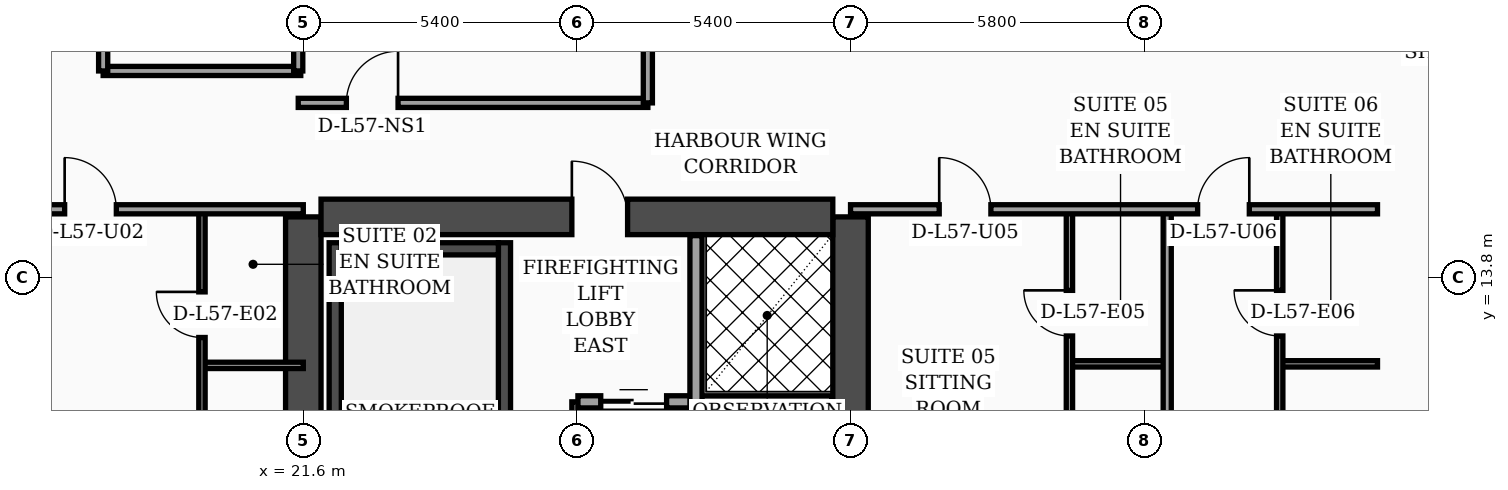
"""IFC4 building model, lengths in metres.
Left out: names, types, materials, properties, quantities, classifications, styles, units other than length and angle.
Written with IfcOpenShell. Run it as: python <this file> out.ifc"""

import sys

from ifc_helpers import new_model, si_unit, direction, frame, frame_2d, origin, place, context, subcontext, project, spatial, rectangle, extrude, element, fill, save


model = new_model("IFC4")
c1 = context("Model", 3, precision=1e-05, world=origin(), true_north=direction((0.0, 1.0)))
c2 = subcontext(c1, "Body", "Model", "MODEL_VIEW")
j1 = project(units=[si_unit("LENGTHUNIT", "METRE"), si_unit("PLANEANGLEUNIT", "RADIAN")], contexts=[c1])
p1 = place(None, origin())
s1 = spatial("IfcSite", under=j1, at=p1, CompositionType="ELEMENT")
p2 = place(p1, origin())
s2 = spatial("IfcBuilding", under=s1, at=p2, CompositionType="ELEMENT")
p3 = place(p2, frame((0.0, 0.0, 230.7)))
s3 = spatial("IfcBuildingStorey", under=s2, at=p3, CompositionType="ELEMENT", Elevation=230.7)
for number, where, z_axis, x_axis in (
    (1, (21.6, 4.6, 0.0), (0.0, 0.0, 1.0), (0.0, 1.0, 0.0)),
    (2, (32.4, 4.6, 0.0), (0.0, 0.0, 1.0), (0.0, 1.0, 0.0)),
):
    element("IfcWall", number, at=place(p3, frame(where, z_axis=z_axis, x_axis=x_axis)), inside=s3, PredefinedType="SHEAR", context=c2, shape_type="SweptSolid", body=[
        extrude(rectangle(XDim=10.4, YDim=0.7, at=frame_2d((5.2, 0.0))), origin(), (0.0, 0.0, 1.0), 3.52),
    ])
p4 = place(p3, frame((21.95, 15.0, 0.0), z_axis=(0.0, 0.0, 1.0), x_axis=(1.0, 0.0, 0.0)))
e3 = element("IfcWall", 3, at=p4, inside=s3, PredefinedType="SHEAR", context=c2, shape_type="SweptSolid", body=[
    extrude(rectangle(XDim=10.1, YDim=0.7, at=frame_2d((5.05, 0.0))), origin(), (0.0, 0.0, 1.0), 3.52),
])
p5 = place(p4, frame((4.95, 0.0, 0.0)))
e4 = element("IfcOpeningElement", 4, at=p5, cuts=e3, PredefinedType="OPENING", context=c2, shape_type="SweptSolid", body=[
    extrude(rectangle(XDim=1.1, YDim=2.2, at=frame_2d((0.55, 1.1))), frame((0.0, 0.36, 0.0), z_axis=(0.0, -1.0, 0.0), x_axis=(1.0, 0.0, 0.0)), (0.0, 0.0, 1.0), 0.72),
])
p6 = place(p3, frame((22.23, 4.95, 0.0), z_axis=(0.0, 0.0, 1.0), x_axis=(0.0, 1.0, 0.0)))
e5 = element("IfcWall", 5, at=p6, inside=s3, PredefinedType="SOLIDWALL", context=c2, shape_type="SweptSolid", body=[
    extrude(rectangle(XDim=9.54, YDim=0.24, at=frame_2d((4.77, 0.0))), origin(), (0.0, 0.0, 1.0), 3.52),
])
p7 = place(p3, frame((25.57, 4.95, 0.0), z_axis=(0.0, 0.0, 1.0), x_axis=(0.0, 1.0, 0.0)))
e6 = element("IfcWall", 6, at=p7, inside=s3, PredefinedType="SOLIDWALL", context=c2, shape_type="SweptSolid", body=[
    extrude(rectangle(XDim=9.54, YDim=0.24, at=frame_2d((4.77, 0.0))), origin(), (0.0, 0.0, 1.0), 3.52),
])
p8 = place(p7, frame((0.35, 0.0, 0.0)))
e7 = element("IfcOpeningElement", 7, at=p8, cuts=e6, PredefinedType="OPENING", context=c2, shape_type="SweptSolid", body=[
    extrude(rectangle(XDim=1.15, YDim=2.2, at=frame_2d((0.575, 1.1))), frame((0.0, 0.13, 0.0), z_axis=(0.0, -1.0, 0.0), x_axis=(1.0, 0.0, 0.0)), (0.0, 0.0, 1.0), 0.26),
])
p9 = place(p3, frame((22.35, 14.37, 0.0), z_axis=(0.0, 0.0, 1.0), x_axis=(1.0, 0.0, 0.0)))
e8 = element("IfcWall", 8, at=p9, inside=s3, PredefinedType="SOLIDWALL", context=c2, shape_type="SweptSolid", body=[
    extrude(rectangle(XDim=3.1, YDim=0.24, at=frame_2d((1.55, 0.0))), origin(), (0.0, 0.0, 1.0), 3.52),
])
p10 = place(p3, frame((49.43, 5.505, 0.0), z_axis=(0.0, 0.0, 1.0), x_axis=(-0.300509063924, 0.953778958931, 0.0)))
e9 = element("IfcWall", 9, at=p10, inside=s3, PredefinedType="SOLIDWALL", context=c2, shape_type="SweptSolid", body=[
    extrude(rectangle(XDim=30.814, YDim=0.32, at=frame_2d((15.407, 0.0))), origin(), (0.0, 0.0, 1.0), 3.52),
])
p11 = place(p10, frame((18.796, 0.0, 0.0)))
e10 = element("IfcOpeningElement", 10, at=p11, cuts=e9, PredefinedType="OPENING", context=c2, shape_type="SweptSolid", body=[
    extrude(rectangle(XDim=1.4, YDim=2.25, at=frame_2d((0.7, 1.125))), frame((0.0, 0.17, 0.0), z_axis=(0.0, -1.0, 0.0), x_axis=(1.0, 0.0, 0.0)), (0.0, 0.0, 1.0), 0.34),
])
p12 = place(p10, frame((4.437, 0.0, 0.7)))
e11 = element("IfcOpeningElement", 11, at=p12, cuts=e9, PredefinedType="OPENING", context=c2, shape_type="SweptSolid", body=[
    extrude(rectangle(XDim=1.6, YDim=1.65, at=frame_2d((0.8, 0.825))), frame((0.0, 0.17, 0.0), z_axis=(0.0, -1.0, 0.0), x_axis=(1.0, 0.0, 0.0)), (0.0, 0.0, 1.0), 0.34),
])
p13 = place(p10, frame((9.889, 0.0, 0.7)))
e12 = element("IfcOpeningElement", 12, at=p13, cuts=e9, PredefinedType="OPENING", context=c2, shape_type="SweptSolid", body=[
    extrude(rectangle(XDim=1.6, YDim=1.65, at=frame_2d((0.8, 0.825))), frame((0.0, 0.17, 0.0), z_axis=(0.0, -1.0, 0.0), x_axis=(1.0, 0.0, 0.0)), (0.0, 0.0, 1.0), 0.34),
])
p14 = place(p10, frame((1.6, 0.0, 0.75)))
e13 = element("IfcOpeningElement", 13, at=p14, cuts=e9, PredefinedType="OPENING", context=c2, shape_type="SweptSolid", body=[
    extrude(rectangle(XDim=1.5, YDim=1.6, at=frame_2d((0.75, 0.8))), frame((0.0, 0.17, 0.0), z_axis=(0.0, -1.0, 0.0), x_axis=(1.0, 0.0, 0.0)), (0.0, 0.0, 1.0), 0.34),
])
p15 = place(p10, frame((7.8, 0.0, 0.75)))
e14 = element("IfcOpeningElement", 14, at=p15, cuts=e9, PredefinedType="OPENING", context=c2, shape_type="SweptSolid", body=[
    extrude(rectangle(XDim=1.5, YDim=1.6, at=frame_2d((0.75, 0.8))), frame((0.0, 0.17, 0.0), z_axis=(0.0, -1.0, 0.0), x_axis=(1.0, 0.0, 0.0)), (0.0, 0.0, 1.0), 0.34),
])
p16 = place(p10, frame((11.95, 0.0, 0.75)))
e15 = element("IfcOpeningElement", 15, at=p16, cuts=e9, PredefinedType="OPENING", context=c2, shape_type="SweptSolid", body=[
    extrude(rectangle(XDim=1.5, YDim=1.6, at=frame_2d((0.75, 0.8))), frame((0.0, 0.17, 0.0), z_axis=(0.0, -1.0, 0.0), x_axis=(1.0, 0.0, 0.0)), (0.0, 0.0, 1.0), 0.34),
])
p17 = place(p10, frame((14.0, 0.0, 0.75)))
e16 = element("IfcOpeningElement", 16, at=p17, cuts=e9, PredefinedType="OPENING", context=c2, shape_type="SweptSolid", body=[
    extrude(rectangle(XDim=1.5, YDim=1.6, at=frame_2d((0.75, 0.8))), frame((0.0, 0.17, 0.0), z_axis=(0.0, -1.0, 0.0), x_axis=(1.0, 0.0, 0.0)), (0.0, 0.0, 1.0), 0.34),
])
p18 = place(p10, frame((16.55, 0.0, 0.75)))
e17 = element("IfcOpeningElement", 17, at=p18, cuts=e9, PredefinedType="OPENING", context=c2, shape_type="SweptSolid", body=[
    extrude(rectangle(XDim=1.5, YDim=1.6, at=frame_2d((0.75, 0.8))), frame((0.0, 0.17, 0.0), z_axis=(0.0, -1.0, 0.0), x_axis=(1.0, 0.0, 0.0)), (0.0, 0.0, 1.0), 0.34),
])
p19 = place(p10, frame((20.75, 0.0, 0.75)))
e18 = element("IfcOpeningElement", 18, at=p19, cuts=e9, PredefinedType="OPENING", context=c2, shape_type="SweptSolid", body=[
    extrude(rectangle(XDim=1.5, YDim=1.6, at=frame_2d((0.75, 0.8))), frame((0.0, 0.17, 0.0), z_axis=(0.0, -1.0, 0.0), x_axis=(1.0, 0.0, 0.0)), (0.0, 0.0, 1.0), 0.34),
])
p20 = place(p10, frame((23.3, 0.0, 0.75)))
e19 = element("IfcOpeningElement", 19, at=p20, cuts=e9, PredefinedType="OPENING", context=c2, shape_type="SweptSolid", body=[
    extrude(rectangle(XDim=1.5, YDim=1.6, at=frame_2d((0.75, 0.8))), frame((0.0, 0.17, 0.0), z_axis=(0.0, -1.0, 0.0), x_axis=(1.0, 0.0, 0.0)), (0.0, 0.0, 1.0), 0.34),
])
p21 = place(p10, frame((26.4, 0.0, 0.75)))
e20 = element("IfcOpeningElement", 20, at=p21, cuts=e9, PredefinedType="OPENING", context=c2, shape_type="SweptSolid", body=[
    extrude(rectangle(XDim=1.5, YDim=1.6, at=frame_2d((0.75, 0.8))), frame((0.0, 0.17, 0.0), z_axis=(0.0, -1.0, 0.0), x_axis=(1.0, 0.0, 0.0)), (0.0, 0.0, 1.0), 0.34),
])
p22 = place(p3, frame((27.02, 4.97, 0.0), z_axis=(0.0, 0.0, 1.0), x_axis=(0.0, 1.0, 0.0)))
e21 = element("IfcWall", 21, at=p22, inside=s3, PredefinedType="SOLIDWALL", context=c2, shape_type="SweptSolid", body=[
    extrude(rectangle(XDim=6.38, YDim=0.24, at=frame_2d((3.19, 0.0))), origin(), (0.0, 0.0, 1.0), 3.52),
])
p23 = place(p3, frame((27.02, 11.35, 0.0), z_axis=(0.0, 0.0, 1.0), x_axis=(1.0, 0.0, 0.0)))
e22 = element("IfcWall", 22, at=p23, inside=s3, PredefinedType="SOLIDWALL", context=c2, shape_type="SweptSolid", body=[
    extrude(rectangle(XDim=5.01, YDim=0.24, at=frame_2d((2.505, 0.0))), origin(), (0.0, 0.0, 1.0), 3.52),
])
p24 = place(p23, frame((0.45, 0.0, 0.0)))
e23 = element("IfcOpeningElement", 23, at=p24, cuts=e22, PredefinedType="OPENING", context=c2, shape_type="SweptSolid", body=[
    extrude(rectangle(XDim=1.3, YDim=2.35, at=frame_2d((0.65, 1.175))), frame((0.0, 0.13, 0.0), z_axis=(0.0, -1.0, 0.0), x_axis=(1.0, 0.0, 0.0)), (0.0, 0.0, 1.0), 0.26),
])
p25 = place(p3, frame((29.35, 4.97, 0.0), z_axis=(0.0, 0.0, 1.0), x_axis=(0.0, 1.0, 0.0)))
e24 = element("IfcWall", 24, at=p25, inside=s3, PredefinedType="SOLIDWALL", context=c2, shape_type="SweptSolid", body=[
    extrude(rectangle(XDim=9.66, YDim=0.24, at=frame_2d((4.83, 0.0))), origin(), (0.0, 0.0, 1.0), 3.52),
])
p26 = place(p25, frame((0.55, 0.0, 0.0)))
e25 = element("IfcOpeningElement", 25, at=p26, cuts=e24, PredefinedType="OPENING", context=c2, shape_type="SweptSolid", body=[
    extrude(rectangle(XDim=1.3, YDim=2.35, at=frame_2d((0.65, 1.175))), frame((0.0, 0.13, 0.0), z_axis=(0.0, -1.0, 0.0), x_axis=(1.0, 0.0, 0.0)), (0.0, 0.0, 1.0), 0.26),
])
p27 = place(p3, frame((19.6, 12.07, 0.0), z_axis=(0.0, 0.0, 1.0), x_axis=(1.0, 0.0, 0.0)))
e26 = element("IfcWall", 26, at=p27, inside=s3, PredefinedType="PARTITIONING", context=c2, shape_type="SweptSolid", body=[
    extrude(rectangle(XDim=2.0, YDim=0.125, at=frame_2d((1.0, 0.0))), origin(), (0.0, 0.0, 1.0), 3.52),
])
p28 = place(p3, frame((19.6, 2.44, 0.0), z_axis=(0.0, 0.0, 1.0), x_axis=(0.0, 1.0, 0.0)))
e27 = element("IfcWall", 27, at=p28, inside=s3, PredefinedType="PARTITIONING", context=c2, shape_type="SweptSolid", body=[
    extrude(rectangle(XDim=12.71, YDim=0.125, at=frame_2d((6.355, 0.0))), origin(), (0.0, 0.0, 1.0), 2.57),
])
p29 = place(p28, frame((4.34, 0.0, 0.0)))
e28 = element("IfcOpeningElement", 28, at=p29, cuts=e27, PredefinedType="OPENING", context=c2, shape_type="SweptSolid", body=[
    extrude(rectangle(XDim=0.96, YDim=2.2, at=frame_2d((0.48, 1.1))), frame((0.0, 0.073, 0.0), z_axis=(0.0, -1.0, 0.0), x_axis=(1.0, 0.0, 0.0)), (0.0, 0.0, 1.0), 0.145),
])
p30 = place(p28, frame((10.18, 0.0, 0.0)))
e29 = element("IfcOpeningElement", 29, at=p30, cuts=e27, PredefinedType="OPENING", context=c2, shape_type="SweptSolid", body=[
    extrude(rectangle(XDim=0.9, YDim=2.15, at=frame_2d((0.45, 1.075))), frame((0.0, 0.073, 0.0), z_axis=(0.0, -1.0, 0.0), x_axis=(1.0, 0.0, 0.0)), (0.0, 0.0, 1.0), 0.145),
])
p31 = place(p3, frame((15.15, 15.15, 0.0), z_axis=(0.0, 0.0, 1.0), x_axis=(1.0, 0.0, 0.0)))
e30 = element("IfcWall", 30, at=p31, inside=s3, PredefinedType="PARTITIONING", context=c2, shape_type="SweptSolid", body=[
    extrude(rectangle(XDim=6.45, YDim=0.18, at=frame_2d((3.225, 0.0))), origin(), (0.0, 0.0, 1.0), 2.57),
])
p32 = place(p31, frame((1.74, 0.0, 0.0)))
e31 = element("IfcOpeningElement", 31, at=p32, cuts=e30, PredefinedType="OPENING", context=c2, shape_type="SweptSolid", body=[
    extrude(rectangle(XDim=1.02, YDim=2.2, at=frame_2d((0.51, 1.1))), frame((0.0, 0.1, 0.0), z_axis=(0.0, -1.0, 0.0), x_axis=(1.0, 0.0, 0.0)), (0.0, 0.0, 1.0), 0.2),
])
p33 = place(p3, frame((17.65, 17.88, 0.0), z_axis=(0.0, 0.0, 1.0), x_axis=(1.0, 0.0, 0.0)))
e32 = element("IfcWall", 32, at=p33, inside=s3, PredefinedType="PARTITIONING", context=c2, shape_type="SweptSolid", body=[
    extrude(rectangle(XDim=3.9, YDim=0.18, at=frame_2d((1.95, 0.0))), origin(), (0.0, 0.0, 1.0), 3.52),
])
p34 = place(p3, frame((21.5, 17.88, 0.0), z_axis=(0.0, 0.0, 1.0), x_axis=(0.0, 1.0, 0.0)))
e33 = element("IfcWall", 33, at=p34, inside=s3, PredefinedType="PARTITIONING", context=c2, shape_type="SweptSolid", body=[
    extrude(rectangle(XDim=6.44, YDim=0.18, at=frame_2d((3.22, 0.0))), origin(), (0.0, 0.0, 1.0), 3.52),
])
p35 = place(p3, frame((17.65, 17.88, 0.0), z_axis=(0.0, 0.0, 1.0), x_axis=(0.0, 1.0, 0.0)))
e34 = element("IfcWall", 34, at=p35, inside=s3, PredefinedType="PARTITIONING", context=c2, shape_type="SweptSolid", body=[
    extrude(rectangle(XDim=6.44, YDim=0.18, at=frame_2d((3.22, 0.0))), origin(), (0.0, 0.0, 1.0), 3.52),
])
p36 = place(p35, frame((0.65, 0.0, 0.0)))
e35 = element("IfcOpeningElement", 35, at=p36, cuts=e34, PredefinedType="OPENING", context=c2, shape_type="SweptSolid", body=[
    extrude(rectangle(XDim=0.98, YDim=2.15, at=frame_2d((0.49, 1.075))), frame((0.0, 0.1, 0.0), z_axis=(0.0, -1.0, 0.0), x_axis=(1.0, 0.0, 0.0)), (0.0, 0.0, 1.0), 0.2),
])
p37 = place(p35, frame((3.97, 0.0, 0.0)))
e36 = element("IfcOpeningElement", 36, at=p37, cuts=e34, PredefinedType="OPENING", context=c2, shape_type="SweptSolid", body=[
    extrude(rectangle(XDim=0.96, YDim=2.2, at=frame_2d((0.48, 1.1))), frame((0.0, 0.1, 0.0), z_axis=(0.0, -1.0, 0.0), x_axis=(1.0, 0.0, 0.0)), (0.0, 0.0, 1.0), 0.2),
])
p38 = place(p3, frame((36.72, 12.1, 0.0), z_axis=(0.0, 0.0, 1.0), x_axis=(1.0, 0.0, 0.0)))
e37 = element("IfcWall", 37, at=p38, inside=s3, PredefinedType="PARTITIONING", context=c2, shape_type="SweptSolid", body=[
    extrude(rectangle(XDim=1.93, YDim=0.125, at=frame_2d((0.965, 0.0))), origin(), (0.0, 0.0, 1.0), 3.52),
])
p39 = place(p3, frame((36.72, 2.44, 0.0), z_axis=(0.0, 0.0, 1.0), x_axis=(0.0, 1.0, 0.0)))
e38 = element("IfcWall", 38, at=p39, inside=s3, PredefinedType="PARTITIONING", context=c2, shape_type="SweptSolid", body=[
    extrude(rectangle(XDim=12.71, YDim=0.125, at=frame_2d((6.355, 0.0))), origin(), (0.0, 0.0, 1.0), 2.92),
])
p40 = place(p39, frame((4.35, 0.0, 0.0)))
e39 = element("IfcOpeningElement", 39, at=p40, cuts=e38, PredefinedType="OPENING", context=c2, shape_type="SweptSolid", body=[
    extrude(rectangle(XDim=0.96, YDim=2.2, at=frame_2d((0.48, 1.1))), frame((0.0, 0.073, 0.0), z_axis=(0.0, -1.0, 0.0), x_axis=(1.0, 0.0, 0.0)), (0.0, 0.0, 1.0), 0.145),
])
p41 = place(p39, frame((10.21, 0.0, 0.0)))
e40 = element("IfcOpeningElement", 40, at=p41, cuts=e38, PredefinedType="OPENING", context=c2, shape_type="SweptSolid", body=[
    extrude(rectangle(XDim=0.9, YDim=2.15, at=frame_2d((0.45, 1.075))), frame((0.0, 0.073, 0.0), z_axis=(0.0, -1.0, 0.0), x_axis=(1.0, 0.0, 0.0)), (0.0, 0.0, 1.0), 0.145),
])
p42 = place(p3, frame((40.87, 12.1, 0.0), z_axis=(0.0, 0.0, 1.0), x_axis=(1.0, 0.0, 0.0)))
e41 = element("IfcWall", 41, at=p42, inside=s3, PredefinedType="PARTITIONING", context=c2, shape_type="SweptSolid", body=[
    extrude(rectangle(XDim=1.93, YDim=0.125, at=frame_2d((0.965, 0.0))), origin(), (0.0, 0.0, 1.0), 3.52),
])
p43 = place(p3, frame((40.87, 2.44, 0.0), z_axis=(0.0, 0.0, 1.0), x_axis=(0.0, 1.0, 0.0)))
e42 = element("IfcWall", 42, at=p43, inside=s3, PredefinedType="PARTITIONING", context=c2, shape_type="SweptSolid", body=[
    extrude(rectangle(XDim=12.71, YDim=0.125, at=frame_2d((6.355, 0.0))), origin(), (0.0, 0.0, 1.0), 2.92),
])
p44 = place(p43, frame((4.35, 0.0, 0.0)))
e43 = element("IfcOpeningElement", 43, at=p44, cuts=e42, PredefinedType="OPENING", context=c2, shape_type="SweptSolid", body=[
    extrude(rectangle(XDim=0.96, YDim=2.2, at=frame_2d((0.48, 1.1))), frame((0.0, 0.073, 0.0), z_axis=(0.0, -1.0, 0.0), x_axis=(1.0, 0.0, 0.0)), (0.0, 0.0, 1.0), 0.145),
])
p45 = place(p43, frame((10.21, 0.0, 0.0)))
e44 = element("IfcOpeningElement", 44, at=p45, cuts=e42, PredefinedType="OPENING", context=c2, shape_type="SweptSolid", body=[
    extrude(rectangle(XDim=0.9, YDim=2.15, at=frame_2d((0.45, 1.075))), frame((0.0, 0.073, 0.0), z_axis=(0.0, -1.0, 0.0), x_axis=(1.0, 0.0, 0.0)), (0.0, 0.0, 1.0), 0.145),
])
p46 = place(p3, frame((38.65, 2.44, 0.0), z_axis=(0.0, 0.0, 1.0), x_axis=(0.0, 1.0, 0.0)))
e45 = element("IfcWall", 45, at=p46, inside=s3, PredefinedType="PARTITIONING", context=c2, shape_type="SweptSolid", body=[
    extrude(rectangle(XDim=12.71, YDim=0.16, at=frame_2d((6.355, 0.0))), origin(), (0.0, 0.0, 1.0), 2.92),
])
p47 = place(p3, frame((32.4, 15.15, 0.0), z_axis=(0.0, 0.0, 1.0), x_axis=(1.0, 0.0, 0.0)))
e46 = element("IfcWall", 46, at=p47, inside=s3, PredefinedType="PARTITIONING", context=c2, shape_type="SweptSolid", body=[
    extrude(rectangle(XDim=10.4, YDim=0.18, at=frame_2d((5.2, 0.0))), origin(), (0.0, 0.0, 1.0), 2.92),
])
p48 = place(p47, frame((1.75, 0.0, 0.0)))
e47 = element("IfcOpeningElement", 47, at=p48, cuts=e46, PredefinedType="OPENING", context=c2, shape_type="SweptSolid", body=[
    extrude(rectangle(XDim=1.02, YDim=2.2, at=frame_2d((0.51, 1.1))), frame((0.0, 0.1, 0.0), z_axis=(0.0, -1.0, 0.0), x_axis=(1.0, 0.0, 0.0)), (0.0, 0.0, 1.0), 0.2),
])
p49 = place(p47, frame((6.85, 0.0, 0.0)))
e48 = element("IfcOpeningElement", 48, at=p49, cuts=e46, PredefinedType="OPENING", context=c2, shape_type="SweptSolid", body=[
    extrude(rectangle(XDim=1.02, YDim=2.2, at=frame_2d((0.51, 1.1))), frame((0.0, 0.1, 0.0), z_axis=(0.0, -1.0, 0.0), x_axis=(1.0, 0.0, 0.0)), (0.0, 0.0, 1.0), 0.2),
])
p50 = place(p3, frame((21.5, 17.25, 0.0), z_axis=(0.0, 0.0, 1.0), x_axis=(1.0, 0.0, 0.0)))
e49 = element("IfcWall", 49, at=p50, inside=s3, PredefinedType="PARTITIONING", context=c2, shape_type="SweptSolid", body=[
    extrude(rectangle(XDim=6.9, YDim=0.18, at=frame_2d((3.45, 0.0))), origin(), (0.0, 0.0, 1.0), 2.92),
])
p51 = place(p50, frame((0.95, 0.0, 0.0)))
e50 = element("IfcOpeningElement", 50, at=p51, cuts=e49, PredefinedType="OPENING", context=c2, shape_type="SweptSolid", body=[
    extrude(rectangle(XDim=1.02, YDim=2.2, at=frame_2d((0.51, 1.1))), frame((0.0, 0.1, 0.0), z_axis=(0.0, -1.0, 0.0), x_axis=(1.0, 0.0, 0.0)), (0.0, 0.0, 1.0), 0.2),
])
p52 = place(p3, frame((28.4, 17.25, 0.0), z_axis=(0.0, 0.0, 1.0), x_axis=(0.0, 1.0, 0.0)))
e51 = element("IfcWall", 51, at=p52, inside=s3, PredefinedType="PARTITIONING", context=c2, shape_type="SweptSolid", body=[
    extrude(rectangle(XDim=13.56, YDim=0.18, at=frame_2d((6.78, 0.0))), origin(), (0.0, 0.0, 1.0), 2.92),
])
p53 = place(p24, origin())
e52 = element("IfcDoor", 52, at=p53, inside=s3, OperationType="DOUBLE_DOOR_SLIDING", PredefinedType="DOOR", context=c2, shape_type="SweptSolid", body=[
    extrude(rectangle(XDim=1.3, YDim=2.35, at=frame_2d((0.65, 1.175))), frame((0.0, 0.025, 0.0), z_axis=(0.0, -1.0, 0.0), x_axis=(1.0, 0.0, 0.0)), (0.0, 0.0, 1.0), 0.05),
])
fill(e23, e52)
p54 = place(p30, origin())
e53 = element("IfcDoor", 53, at=p54, inside=s3, OperationType="SINGLE_SWING_RIGHT", PredefinedType="DOOR", context=c2, shape_type="SweptSolid", body=[
    extrude(rectangle(XDim=0.9, YDim=2.15, at=frame_2d((0.45, 1.075))), frame((0.0, 0.025, 0.0), z_axis=(0.0, -1.0, 0.0), x_axis=(1.0, 0.0, 0.0)), (0.0, 0.0, 1.0), 0.05),
])
fill(e29, e53)
p55 = place(p32, origin())
e54 = element("IfcDoor", 54, at=p55, inside=s3, OperationType="SINGLE_SWING_LEFT", PredefinedType="DOOR", context=c2, shape_type="SweptSolid", body=[
    extrude(rectangle(XDim=1.02, YDim=2.2, at=frame_2d((0.51, 1.1))), frame((0.0, 0.025, 0.0), z_axis=(0.0, -1.0, 0.0), x_axis=(1.0, 0.0, 0.0)), (0.0, 0.0, 1.0), 0.05),
])
fill(e31, e54)
p56 = place(p41, origin())
e55 = element("IfcDoor", 55, at=p56, inside=s3, OperationType="SINGLE_SWING_RIGHT", PredefinedType="DOOR", context=c2, shape_type="SweptSolid", body=[
    extrude(rectangle(XDim=0.9, YDim=2.15, at=frame_2d((0.45, 1.075))), frame((0.0, 0.025, 0.0), z_axis=(0.0, -1.0, 0.0), x_axis=(1.0, 0.0, 0.0)), (0.0, 0.0, 1.0), 0.05),
])
fill(e40, e55)
p57 = place(p45, origin())
e56 = element("IfcDoor", 56, at=p57, inside=s3, OperationType="SINGLE_SWING_RIGHT", PredefinedType="DOOR", context=c2, shape_type="SweptSolid", body=[
    extrude(rectangle(XDim=0.9, YDim=2.15, at=frame_2d((0.45, 1.075))), frame((0.0, 0.025, 0.0), z_axis=(0.0, -1.0, 0.0), x_axis=(1.0, 0.0, 0.0)), (0.0, 0.0, 1.0), 0.05),
])
fill(e44, e56)
p58 = place(p48, origin())
e57 = element("IfcDoor", 57, at=p58, inside=s3, OperationType="SINGLE_SWING_LEFT", PredefinedType="DOOR", context=c2, shape_type="SweptSolid", body=[
    extrude(rectangle(XDim=1.02, YDim=2.2, at=frame_2d((0.51, 1.1))), frame((0.0, 0.025, 0.0), z_axis=(0.0, -1.0, 0.0), x_axis=(1.0, 0.0, 0.0)), (0.0, 0.0, 1.0), 0.05),
])
fill(e47, e57)
p59 = place(p49, origin())
e58 = element("IfcDoor", 58, at=p59, inside=s3, OperationType="SINGLE_SWING_RIGHT", PredefinedType="DOOR", context=c2, shape_type="SweptSolid", body=[
    extrude(rectangle(XDim=1.02, YDim=2.2, at=frame_2d((0.51, 1.1))), frame((0.0, 0.025, 0.0), z_axis=(0.0, -1.0, 0.0), x_axis=(1.0, 0.0, 0.0)), (0.0, 0.0, 1.0), 0.05),
])
fill(e48, e58)
p60 = place(p51, origin())
e59 = element("IfcDoor", 59, at=p60, inside=s3, OperationType="SINGLE_SWING_RIGHT", PredefinedType="DOOR", context=c2, shape_type="SweptSolid", body=[
    extrude(rectangle(XDim=1.02, YDim=2.2, at=frame_2d((0.51, 1.1))), frame((0.0, 0.025, 0.0), z_axis=(0.0, -1.0, 0.0), x_axis=(1.0, 0.0, 0.0)), (0.0, 0.0, 1.0), 0.05),
])
fill(e50, e59)
p61 = place(p5, origin())
e60 = element("IfcDoor", 60, at=p61, inside=s3, OperationType="SINGLE_SWING_LEFT", PredefinedType="DOOR", context=c2, shape_type="SweptSolid", body=[
    extrude(rectangle(XDim=1.1, YDim=2.2, at=frame_2d((0.55, 1.1))), frame((0.0, 0.025, 0.0), z_axis=(0.0, -1.0, 0.0), x_axis=(1.0, 0.0, 0.0)), (0.0, 0.0, 1.0), 0.05),
])
fill(e4, e60)
save(model, sys.argv[1])
